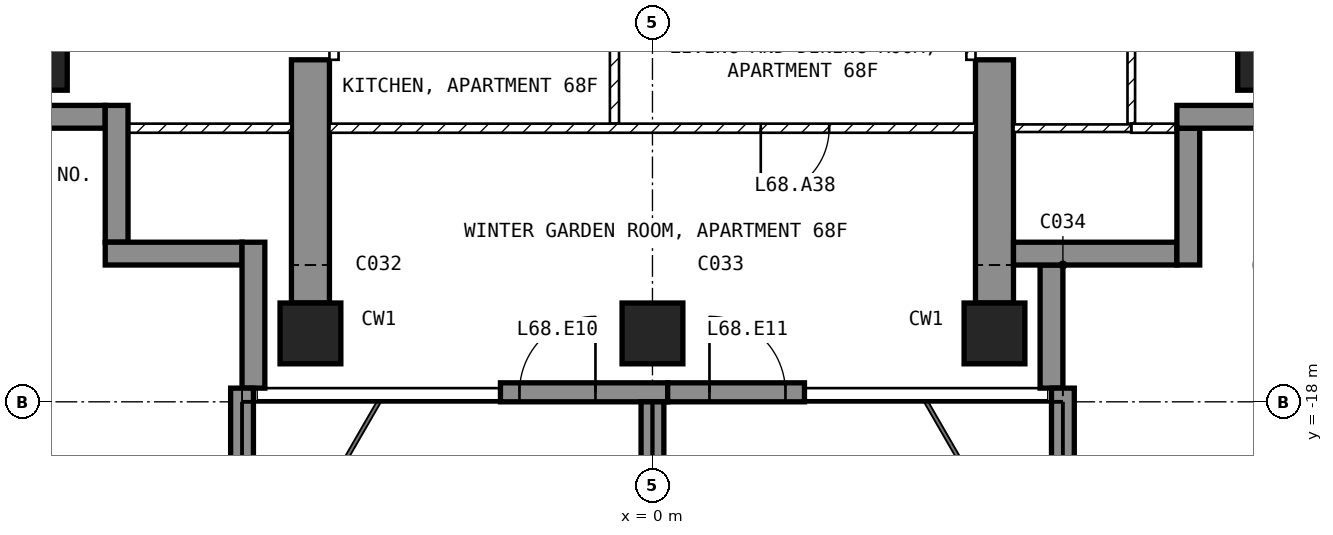
"""IFC4 building model, lengths in metres.
Left out: names, types, materials, properties, quantities, classifications, styles, units other than length and angle.
Written with IfcOpenShell. Run it as: python <this file> out.ifc"""

import sys

from ifc_helpers import new_model, si_unit, direction, frame, frame_2d, origin, origin_2d, place, context, subcontext, project, spatial, polyline, rectangle, outline, extrude, element, fill, save


model = new_model("IFC4")
c1 = context("Model", 3, precision=1e-05, world=origin(), true_north=direction((0.0, 1.0)))
c2 = subcontext(c1, "Body", "Model", "MODEL_VIEW")
j1 = project(units=[si_unit("LENGTHUNIT", "METRE"), si_unit("PLANEANGLEUNIT", "RADIAN")], contexts=[c1])
p1 = place(None, origin())
s1 = spatial("IfcSite", under=j1, at=p1, CompositionType="ELEMENT")
p2 = place(p1, origin())
s2 = spatial("IfcBuilding", under=s1, at=p2, CompositionType="ELEMENT")
p3 = place(p2, frame((0.0, 0.0, 267.5)))
s3 = spatial("IfcBuildingStorey", under=s2, at=p3, CompositionType="ELEMENT", Elevation=267.5)
for number, where, z_axis, x_axis in (
    (1, (-8.1, -13.5, -0.25), (0.0, 0.0, 1.0), (1.0, 0.0, 0.0)),
    (2, (-4.5, -17.1, -0.25), (0.0, 0.0, 1.0), (1.0, 0.0, 0.0)),
    (3, (0.0, -17.1, -0.25), (0.0, 0.0, 1.0), (1.0, 0.0, 0.0)),
    (4, (4.5, -17.1, -0.25), (0.0, 0.0, 1.0), (1.0, 0.0, 0.0)),
    (5, (8.1, -13.5, -0.25), (0.0, 0.0, 1.0), (1.0, 0.0, 0.0)),
):
    element("IfcColumn", number, at=place(p3, frame(where, z_axis=z_axis, x_axis=x_axis)), inside=s3, PredefinedType="COLUMN", context=c2, shape_type="SweptSolid", body=[
        extrude(rectangle(XDim=0.8, YDim=0.8, at=origin_2d()), origin(), (0.0, 0.0, 1.0), 3.5),
    ])
for number, where, z_axis, x_axis in (
    (6, (-4.75, -16.7, -0.25), (1.0, 0.0, 0.0), (0.0, 1.0, 0.0)),
    (7, (4.25, -16.7, -0.25), (1.0, 0.0, 0.0), (0.0, 1.0, 0.0)),
):
    element("IfcWall", number, at=place(p3, frame(where, z_axis=z_axis, x_axis=x_axis)), inside=s3, PredefinedType="SHEAR", context=c2, shape_type="SweptSolid", body=[
        extrude(outline(polyline([(0.0, 0.0), (3.2, 0.0), (3.2, 2.65), (5.6, 2.65), (5.6, 0.0), (7.7, 0.0), (7.7, 3.5), (0.0, 3.5), (0.0, 0.0)])), origin(), (0.0, 0.0, 1.0), 0.5),
    ])
p4 = place(p3, frame((-2.0, -17.875, 0.0), z_axis=(0.0, 0.0, 1.0), x_axis=(1.0, 0.0, 0.0)))
e8 = element("IfcWall", 8, at=p4, inside=s3, PredefinedType="SOLIDWALL", context=c2, shape_type="SweptSolid", body=[
    extrude(rectangle(XDim=2.2, YDim=0.25, at=frame_2d((1.1, 0.0))), origin(), (0.0, 0.0, 1.0), 3.25),
])
p5 = place(p4, frame((0.25, 0.0, 0.0)))
e9 = element("IfcOpeningElement", 9, at=p5, cuts=e8, PredefinedType="OPENING", context=c2, shape_type="SweptSolid", body=[
    extrude(rectangle(XDim=1.0, YDim=2.4, at=frame_2d((0.5, 1.2))), frame((0.0, 0.135, 0.0), z_axis=(0.0, -1.0, 0.0), x_axis=(1.0, 0.0, 0.0)), (0.0, 0.0, 1.0), 0.27),
])
p6 = place(p3, frame((0.2, -17.875, 0.0), z_axis=(0.0, 0.0, 1.0), x_axis=(1.0, 0.0, 0.0)))
e10 = element("IfcWall", 10, at=p6, inside=s3, PredefinedType="SOLIDWALL", context=c2, shape_type="SweptSolid", body=[
    extrude(rectangle(XDim=1.8, YDim=0.25, at=frame_2d((0.9, 0.0))), origin(), (0.0, 0.0, 1.0), 3.25),
])
p7 = place(p6, frame((0.55, 0.0, 0.0)))
e11 = element("IfcOpeningElement", 11, at=p7, cuts=e10, PredefinedType="OPENING", context=c2, shape_type="SweptSolid", body=[
    extrude(rectangle(XDim=1.0, YDim=2.4, at=frame_2d((0.5, 1.2))), frame((0.0, 0.135, 0.0), z_axis=(0.0, -1.0, 0.0), x_axis=(1.0, 0.0, 0.0)), (0.0, 0.0, 1.0), 0.27),
])
p8 = place(p3, frame((5.25, -17.82, 0.0), z_axis=(0.0, 0.0, 1.0), x_axis=(0.0, 1.0, 0.0)))
e12 = element("IfcWall", 12, at=p8, inside=s3, PredefinedType="SOLIDWALL", context=c2, shape_type="SweptSolid", body=[
    extrude(rectangle(XDim=1.62, YDim=0.3, at=frame_2d((0.81, 0.0))), origin(), (0.0, 0.0, 1.0), 3.25),
])
p9 = place(p3, frame((4.75, -16.05, 0.0), z_axis=(0.0, 0.0, 1.0), x_axis=(1.0, 0.0, 0.0)))
e13 = element("IfcWall", 13, at=p9, inside=s3, PredefinedType="SOLIDWALL", context=c2, shape_type="SweptSolid", body=[
    extrude(rectangle(XDim=2.15, YDim=0.3, at=frame_2d((1.075, 0.0))), origin(), (0.0, 0.0, 1.0), 3.25),
])
p10 = place(p3, frame((7.05, -16.2, 0.0), z_axis=(0.0, 0.0, 1.0), x_axis=(0.0, 1.0, 0.0)))
e14 = element("IfcWall", 14, at=p10, inside=s3, PredefinedType="SOLIDWALL", context=c2, shape_type="SweptSolid", body=[
    extrude(rectangle(XDim=1.8, YDim=0.3, at=frame_2d((0.9, 0.0))), origin(), (0.0, 0.0, 1.0), 3.25),
])
p11 = place(p3, frame((6.9, -14.25, 0.0), z_axis=(0.0, 0.0, 1.0), x_axis=(1.0, 0.0, 0.0)))
e15 = element("IfcWall", 15, at=p11, inside=s3, PredefinedType="SOLIDWALL", context=c2, shape_type="SweptSolid", body=[
    extrude(rectangle(XDim=1.85, YDim=0.3, at=frame_2d((0.925, 0.0))), origin(), (0.0, 0.0, 1.0), 3.25),
])
p12 = place(p3, frame((-8.75, -14.25, 0.0), z_axis=(0.0, 0.0, 1.0), x_axis=(1.0, 0.0, 0.0)))
e16 = element("IfcWall", 16, at=p12, inside=s3, PredefinedType="SOLIDWALL", context=c2, shape_type="SweptSolid", body=[
    extrude(rectangle(XDim=1.55, YDim=0.3, at=frame_2d((0.775, 0.0))), origin(), (0.0, 0.0, 1.0), 3.25),
])
p13 = place(p3, frame((-7.05, -14.1, 0.0), z_axis=(0.0, 0.0, 1.0), x_axis=(0.0, -1.0, 0.0)))
e17 = element("IfcWall", 17, at=p13, inside=s3, PredefinedType="SOLIDWALL", context=c2, shape_type="SweptSolid", body=[
    extrude(rectangle(XDim=1.8, YDim=0.3, at=frame_2d((0.9, 0.0))), origin(), (0.0, 0.0, 1.0), 3.25),
])
p14 = place(p3, frame((-7.2, -16.05, 0.0), z_axis=(0.0, 0.0, 1.0), x_axis=(1.0, 0.0, 0.0)))
e18 = element("IfcWall", 18, at=p14, inside=s3, PredefinedType="SOLIDWALL", context=c2, shape_type="SweptSolid", body=[
    extrude(rectangle(XDim=1.8, YDim=0.3, at=frame_2d((0.9, 0.0))), origin(), (0.0, 0.0, 1.0), 3.25),
])
p15 = place(p3, frame((-5.25, -15.9, 0.0), z_axis=(0.0, 0.0, 1.0), x_axis=(0.0, -1.0, 0.0)))
e19 = element("IfcWall", 19, at=p15, inside=s3, PredefinedType="SOLIDWALL", context=c2, shape_type="SweptSolid", body=[
    extrude(rectangle(XDim=1.92, YDim=0.3, at=frame_2d((0.96, 0.0))), origin(), (0.0, 0.0, 1.0), 3.25),
])
p16 = place(p3, frame((-5.4, -17.82, 0.0), z_axis=(0.0, 0.0, 1.0), x_axis=(0.0, -1.0, 0.0)))
e20 = element("IfcWall", 20, at=p16, inside=s3, PredefinedType="SOLIDWALL", context=c2, shape_type="SweptSolid", body=[
    extrude(rectangle(XDim=2.88, YDim=0.3, at=frame_2d((1.44, 0.0))), origin(), (0.0, 0.0, 1.0), 3.25),
])
p17 = place(p3, frame((0.0, -18.0, 0.0), z_axis=(0.0, 0.0, 1.0), x_axis=(0.0, -1.0, 0.0)))
e21 = element("IfcWall", 21, at=p17, inside=s3, PredefinedType="SOLIDWALL", context=c2, shape_type="SweptSolid", body=[
    extrude(rectangle(XDim=2.7, YDim=0.3, at=frame_2d((1.35, 0.0))), origin(), (0.0, 0.0, 1.0), 3.25),
])
p18 = place(p3, frame((5.4, -17.82, 0.0), z_axis=(0.0, 0.0, 1.0), x_axis=(0.0, -1.0, 0.0)))
e22 = element("IfcWall", 22, at=p18, inside=s3, PredefinedType="SOLIDWALL", context=c2, shape_type="SweptSolid", body=[
    extrude(rectangle(XDim=2.88, YDim=0.3, at=frame_2d((1.44, 0.0))), origin(), (0.0, 0.0, 1.0), 3.25),
])
p19 = place(p3, frame((-0.5, -14.34, 0.0), z_axis=(0.0, 0.0, 1.0), x_axis=(0.0, 1.0, 0.0)))
e23 = element("IfcWall", 23, at=p19, inside=s3, PredefinedType="PARTITIONING", context=c2, shape_type="SweptSolid", body=[
    extrude(rectangle(XDim=2.88, YDim=0.12, at=frame_2d((1.44, 0.0))), origin(), (0.0, 0.0, 1.0), 3.25),
])
p20 = place(p19, frame((0.99, 0.0, 0.0)))
e24 = element("IfcOpeningElement", 24, at=p20, cuts=e23, PredefinedType="OPENING", context=c2, shape_type="SweptSolid", body=[
    extrude(rectangle(XDim=0.9, YDim=2.1, at=frame_2d((0.45, 1.05))), frame((0.0, 0.07, 0.0), z_axis=(0.0, -1.0, 0.0), x_axis=(1.0, 0.0, 0.0)), (0.0, 0.0, 1.0), 0.14),
])
p21 = place(p3, frame((4.25, -14.4, 0.0), z_axis=(0.0, 0.0, 1.0), x_axis=(-1.0, 0.0, 0.0)))
e25 = element("IfcWall", 25, at=p21, inside=s3, PredefinedType="PARTITIONING", context=c2, shape_type="SweptSolid", body=[
    extrude(rectangle(XDim=8.5, YDim=0.12, at=frame_2d((4.25, 0.0))), origin(), (0.0, 0.0, 1.0), 3.25),
])
p22 = place(p21, frame((1.925, 0.0, 0.0)))
e26 = element("IfcOpeningElement", 26, at=p22, cuts=e25, PredefinedType="OPENING", context=c2, shape_type="SweptSolid", body=[
    extrude(rectangle(XDim=0.9, YDim=2.1, at=frame_2d((0.45, 1.05))), frame((0.0, 0.07, 0.0), z_axis=(0.0, -1.0, 0.0), x_axis=(1.0, 0.0, 0.0)), (0.0, 0.0, 1.0), 0.14),
])
p23 = place(p3, frame((6.3, -14.34, 0.0), z_axis=(0.0, 0.0, 1.0), x_axis=(0.0, 1.0, 0.0)))
e27 = element("IfcWall", 27, at=p23, inside=s3, PredefinedType="PARTITIONING", context=c2, shape_type="SweptSolid", body=[
    extrude(rectangle(XDim=2.89, YDim=0.1, at=frame_2d((1.445, 0.0))), origin(), (0.0, 0.0, 1.0), 3.25),
])
p24 = place(p23, frame((1.02, 0.0, 0.0)))
e28 = element("IfcOpeningElement", 28, at=p24, cuts=e27, PredefinedType="OPENING", context=c2, shape_type="SweptSolid", body=[
    extrude(rectangle(XDim=0.85, YDim=2.1, at=frame_2d((0.425, 1.05))), frame((0.0, 0.06, 0.0), z_axis=(0.0, -1.0, 0.0), x_axis=(1.0, 0.0, 0.0)), (0.0, 0.0, 1.0), 0.12),
])
p25 = place(p3, frame((7.12, -14.4, 0.0), z_axis=(0.0, 0.0, 1.0), x_axis=(-1.0, 0.0, 0.0)))
e29 = element("IfcWall", 29, at=p25, inside=s3, PredefinedType="PARTITIONING", context=c2, shape_type="SweptSolid", body=[
    extrude(rectangle(XDim=0.82, YDim=0.12, at=frame_2d((0.41, 0.0))), origin(), (0.0, 0.0, 1.0), 3.25),
])
p26 = place(p3, frame((6.3, -14.4, 0.0), z_axis=(0.0, 0.0, 1.0), x_axis=(-1.0, 0.0, 0.0)))
e30 = element("IfcWall", 30, at=p26, inside=s3, PredefinedType="PARTITIONING", context=c2, shape_type="SweptSolid", body=[
    extrude(rectangle(XDim=1.55, YDim=0.1, at=frame_2d((0.775, 0.0))), origin(), (0.0, 0.0, 1.0), 3.25),
])
p27 = place(p3, frame((-4.75, -14.4, 0.0), z_axis=(0.0, 0.0, 1.0), x_axis=(-1.0, 0.0, 0.0)))
e31 = element("IfcWall", 31, at=p27, inside=s3, PredefinedType="PARTITIONING", context=c2, shape_type="SweptSolid", body=[
    extrude(rectangle(XDim=2.37, YDim=0.12, at=frame_2d((1.185, 0.0))), origin(), (0.0, 0.0, 1.0), 3.25),
])
p28 = place(p3, frame((4.19, -11.1, 0.0), z_axis=(0.0, 0.0, 1.0), x_axis=(0.0, -1.0, 0.0)))
e32 = element("IfcWall", 32, at=p28, inside=s3, PredefinedType="PARTITIONING", context=c2, shape_type="SweptSolid", body=[
    extrude(rectangle(XDim=2.4, YDim=0.12, at=frame_2d((1.2, 0.0))), origin(), (0.0, 0.0, 1.0), 2.4),
])
p29 = place(p28, frame((0.75, 0.0, 0.0)))
e33 = element("IfcOpeningElement", 33, at=p29, cuts=e32, PredefinedType="OPENING", context=c2, shape_type="SweptSolid", body=[
    extrude(rectangle(XDim=0.9, YDim=2.1, at=frame_2d((0.45, 1.05))), frame((0.0, 0.07, 0.0), z_axis=(0.0, -1.0, 0.0), x_axis=(1.0, 0.0, 0.0)), (0.0, 0.0, 1.0), 0.14),
])
p30 = place(p3, frame((-4.19, -11.1, 0.0), z_axis=(0.0, 0.0, 1.0), x_axis=(0.0, -1.0, 0.0)))
e34 = element("IfcWall", 34, at=p30, inside=s3, PredefinedType="PARTITIONING", context=c2, shape_type="SweptSolid", body=[
    extrude(rectangle(XDim=2.4, YDim=0.12, at=frame_2d((1.2, 0.0))), origin(), (0.0, 0.0, 1.0), 2.4),
])
p31 = place(p30, frame((0.75, 0.0, 0.0)))
e35 = element("IfcOpeningElement", 35, at=p31, cuts=e34, PredefinedType="OPENING", context=c2, shape_type="SweptSolid", body=[
    extrude(rectangle(XDim=0.9, YDim=2.1, at=frame_2d((0.45, 1.05))), frame((0.0, 0.07, 0.0), z_axis=(0.0, -1.0, 0.0), x_axis=(1.0, 0.0, 0.0)), (0.0, 0.0, 1.0), 0.14),
])
p32 = place(p5, origin())
e36 = element("IfcDoor", 36, at=p32, inside=s3, OperationType="SINGLE_SWING_RIGHT", PredefinedType="DOOR", context=c2, shape_type="SweptSolid", body=[
    extrude(rectangle(XDim=1.0, YDim=2.4, at=frame_2d((0.5, 1.2))), frame((0.0, 0.025, 0.0), z_axis=(0.0, -1.0, 0.0), x_axis=(1.0, 0.0, 0.0)), (0.0, 0.0, 1.0), 0.05),
])
fill(e9, e36)
p33 = place(p7, origin())
e37 = element("IfcDoor", 37, at=p33, inside=s3, OperationType="SINGLE_SWING_LEFT", PredefinedType="DOOR", context=c2, shape_type="SweptSolid", body=[
    extrude(rectangle(XDim=1.0, YDim=2.4, at=frame_2d((0.5, 1.2))), frame((0.0, 0.025, 0.0), z_axis=(0.0, -1.0, 0.0), x_axis=(1.0, 0.0, 0.0)), (0.0, 0.0, 1.0), 0.05),
])
fill(e11, e37)
p34 = place(p22, origin())
e38 = element("IfcDoor", 38, at=p34, inside=s3, OperationType="SINGLE_SWING_RIGHT", PredefinedType="DOOR", context=c2, shape_type="SweptSolid", body=[
    extrude(rectangle(XDim=0.9, YDim=2.1, at=frame_2d((0.45, 1.05))), frame((0.0, 0.025, 0.0), z_axis=(0.0, -1.0, 0.0), x_axis=(1.0, 0.0, 0.0)), (0.0, 0.0, 1.0), 0.05),
])
fill(e26, e38)
save(model, sys.argv[1])
